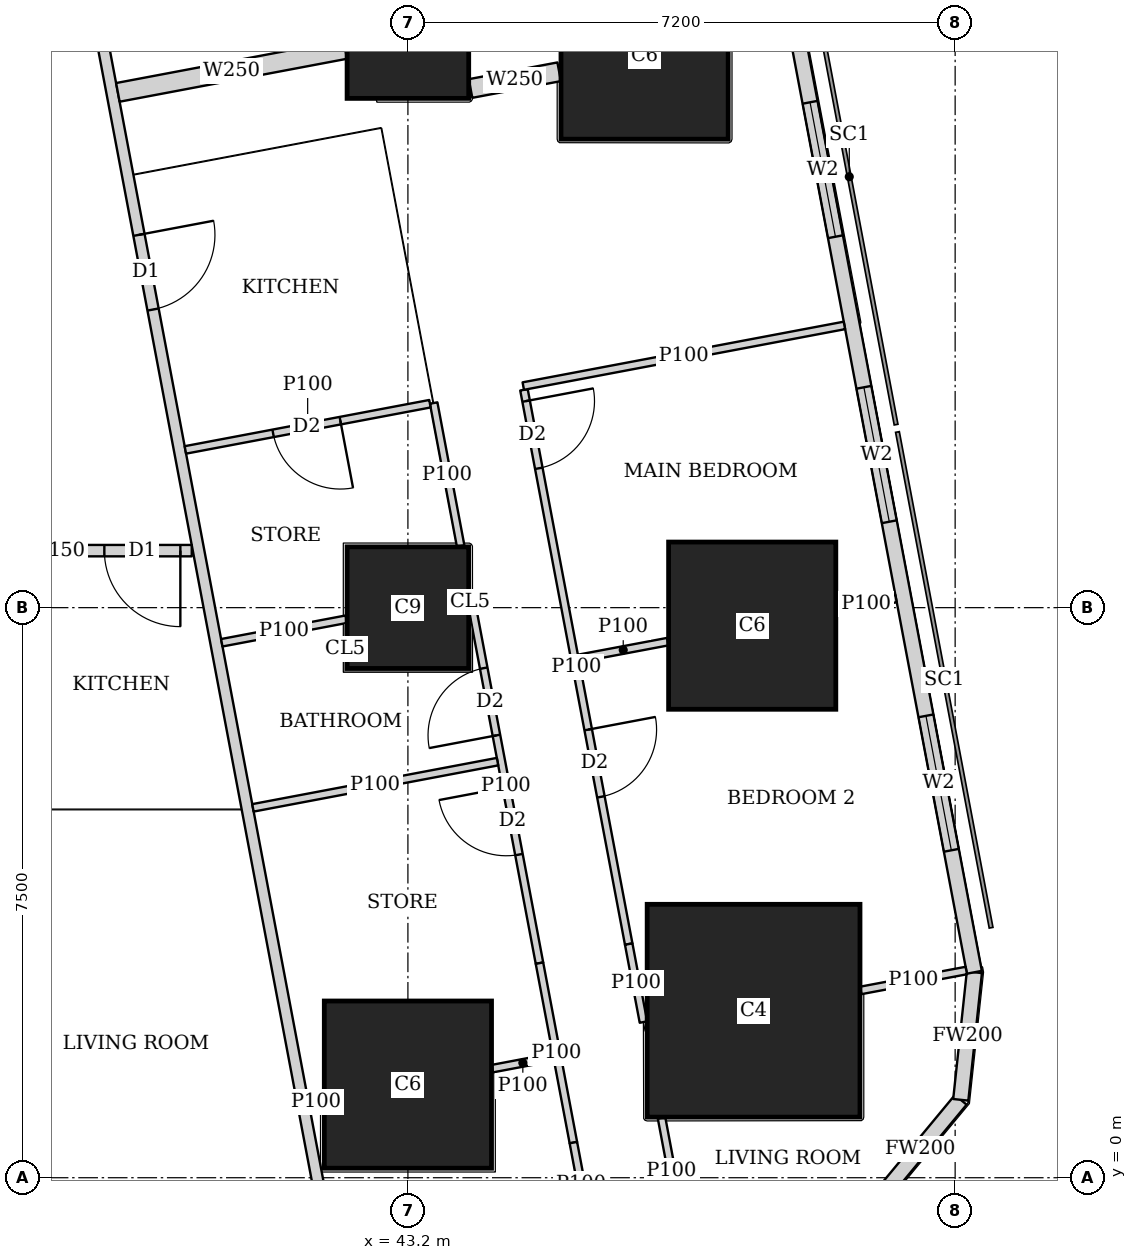
"""IFC4 building model, lengths in metres.
Left out: names, types, materials, properties, quantities, classifications, styles, units other than length and angle.
Written with IfcOpenShell. Run it as: python <this file> out.ifc"""

import sys

from ifc_helpers import new_model, si_unit, direction, frame, frame_2d, origin, origin_2d, place, context, subcontext, project, spatial, rectangle, extrude, element, fill, save


model = new_model("IFC4")
c1 = context("Model", 3, precision=1e-05, world=origin(), true_north=direction((0.0, 1.0)))
c2 = subcontext(c1, "Body", "Model", "MODEL_VIEW")
j1 = project(units=[si_unit("LENGTHUNIT", "METRE"), si_unit("PLANEANGLEUNIT", "RADIAN")], contexts=[c1])
p1 = place(None, origin())
s1 = spatial("IfcSite", under=j1, at=p1, CompositionType="ELEMENT")
p2 = place(p1, origin())
s2 = spatial("IfcBuilding", under=s1, at=p2, CompositionType="ELEMENT")
p3 = place(p2, frame((0.0, 0.0, 122.9)))
s3 = spatial("IfcBuildingStorey", under=s2, at=p3, CompositionType="ELEMENT", Elevation=122.9)
p4 = place(p3, frame((43.2, 1.225, 0.0), z_axis=(0.0, 0.0, 1.0), x_axis=(1.0, 0.0, 0.0)))
e1 = element("IfcColumn", 1, at=p4, inside=s3, PredefinedType="COLUMN", context=c2, shape_type="SweptSolid", body=[
    extrude(rectangle(XDim=2.2, YDim=2.2, at=origin_2d()), origin(), (0.0, 0.0, 1.0), 3.75),
])
p5 = place(p3, frame((47.748, 2.197, 0.0), z_axis=(0.0, 0.0, 1.0), x_axis=(1.0, 0.0, 0.0)))
e2 = element("IfcColumn", 2, at=p5, inside=s3, PredefinedType="COLUMN", context=c2, shape_type="SweptSolid", body=[
    extrude(rectangle(XDim=2.8, YDim=2.8, at=origin_2d()), origin(), (0.0, 0.0, 1.0), 3.75),
])
p6 = place(p3, frame((43.2, 7.5, 0.0), z_axis=(0.0, 0.0, 1.0), x_axis=(1.0, 0.0, 0.0)))
e3 = element("IfcColumn", 3, at=p6, inside=s3, PredefinedType="COLUMN", context=c2, shape_type="SweptSolid", body=[
    extrude(rectangle(XDim=1.6, YDim=1.6, at=origin_2d()), origin(), (0.0, 0.0, 1.0), 3.75),
])
p7 = place(p3, frame((47.73, 7.263, 0.0), z_axis=(0.0, 0.0, 1.0), x_axis=(1.0, 0.0, 0.0)))
e4 = element("IfcColumn", 4, at=p7, inside=s3, PredefinedType="COLUMN", context=c2, shape_type="SweptSolid", body=[
    extrude(rectangle(XDim=2.2, YDim=2.2, at=origin_2d()), origin(), (0.0, 0.0, 1.0), 3.75),
])
p8 = place(p3, frame((43.2, 15.0, 0.0), z_axis=(0.0, 0.0, 1.0), x_axis=(1.0, 0.0, 0.0)))
e5 = element("IfcColumn", 5, at=p8, inside=s3, PredefinedType="COLUMN", context=c2, shape_type="SweptSolid", body=[
    extrude(rectangle(XDim=1.6, YDim=1.6, at=origin_2d()), origin(), (0.0, 0.0, 1.0), 3.75),
])
p9 = place(p3, frame((46.314, 14.763, 0.0), z_axis=(0.0, 0.0, 1.0), x_axis=(1.0, 0.0, 0.0)))
e6 = element("IfcColumn", 6, at=p9, inside=s3, PredefinedType="COLUMN", context=c2, shape_type="SweptSolid", body=[
    extrude(rectangle(XDim=2.2, YDim=2.2, at=origin_2d()), origin(), (0.0, 0.0, 1.0), 3.75),
])
p10 = place(p3, frame((49.407, -0.263, 0.0), z_axis=(0.0, 0.0, 1.0), x_axis=(0.638042593423, 0.770001070764, 0.0)))
e7 = element("IfcWall", 7, at=p10, inside=s3, PredefinedType="SOLIDWALL", context=c2, shape_type="SweptSolid", body=[
    extrude(rectangle(XDim=1.673, YDim=0.2, at=frame_2d((0.836, 0.0))), origin(), (0.0, 0.0, 1.0), 3.5),
])
p11 = place(p3, frame((50.474, 1.025, 0.0), z_axis=(0.0, 0.0, 1.0), x_axis=(0.106047815515, 0.994361031429, 0.0)))
e8 = element("IfcWall", 8, at=p11, inside=s3, PredefinedType="SOLIDWALL", context=c2, shape_type="SweptSolid", body=[
    extrude(rectangle(XDim=1.688, YDim=0.2, at=frame_2d((0.844, 0.0))), origin(), (0.0, 0.0, 1.0), 3.5),
])
p12 = place(p3, frame((50.653, 2.703, 0.0), z_axis=(0.0, 0.0, 1.0), x_axis=(-0.185612026696, 0.982623109613, 0.0)))
e9 = element("IfcWall", 9, at=p12, inside=s3, PredefinedType="SOLIDWALL", context=c2, shape_type="SweptSolid", body=[
    extrude(rectangle(XDim=41.393, YDim=0.2, at=frame_2d((20.697, 0.0))), origin(), (0.0, 0.0, 1.0), 3.5),
])
p13 = place(p12, frame((1.633, 0.0, 0.9)))
e10 = element("IfcOpeningElement", 10, at=p13, cuts=e9, PredefinedType="OPENING", context=c2, shape_type="SweptSolid", body=[
    extrude(rectangle(XDim=1.8, YDim=1.5, at=frame_2d((0.9, 0.75))), frame((0.0, 0.11, 0.0), z_axis=(0.0, -1.0, 0.0), x_axis=(1.0, 0.0, 0.0)), (0.0, 0.0, 1.0), 0.22),
])
p14 = place(p12, frame((6.032, 0.0, 0.9)))
e11 = element("IfcOpeningElement", 11, at=p14, cuts=e9, PredefinedType="OPENING", context=c2, shape_type="SweptSolid", body=[
    extrude(rectangle(XDim=1.8, YDim=1.5, at=frame_2d((0.9, 0.75))), frame((0.0, 0.11, 0.0), z_axis=(0.0, -1.0, 0.0), x_axis=(1.0, 0.0, 0.0)), (0.0, 0.0, 1.0), 0.22),
])
p15 = place(p12, frame((9.848, 0.0, 0.9)))
e12 = element("IfcOpeningElement", 12, at=p15, cuts=e9, PredefinedType="OPENING", context=c2, shape_type="SweptSolid", body=[
    extrude(rectangle(XDim=1.8, YDim=1.5, at=frame_2d((0.9, 0.75))), frame((0.0, 0.11, 0.0), z_axis=(0.0, -1.0, 0.0), x_axis=(1.0, 0.0, 0.0)), (0.0, 0.0, 1.0), 0.22),
])
p16 = place(p12, frame((13.664, 0.0, 0.9)))
e13 = element("IfcOpeningElement", 13, at=p16, cuts=e9, PredefinedType="OPENING", context=c2, shape_type="SweptSolid", body=[
    extrude(rectangle(XDim=1.8, YDim=1.5, at=frame_2d((0.9, 0.75))), frame((0.0, 0.11, 0.0), z_axis=(0.0, -1.0, 0.0), x_axis=(1.0, 0.0, 0.0)), (0.0, 0.0, 1.0), 0.22),
])
p17 = place(p12, frame((17.481, 0.0, 0.9)))
e14 = element("IfcOpeningElement", 14, at=p17, cuts=e9, PredefinedType="OPENING", context=c2, shape_type="SweptSolid", body=[
    extrude(rectangle(XDim=1.8, YDim=1.5, at=frame_2d((0.9, 0.75))), frame((0.0, 0.11, 0.0), z_axis=(0.0, -1.0, 0.0), x_axis=(1.0, 0.0, 0.0)), (0.0, 0.0, 1.0), 0.22),
])
p18 = place(p12, frame((21.297, 0.0, 0.9)))
e15 = element("IfcOpeningElement", 15, at=p18, cuts=e9, PredefinedType="OPENING", context=c2, shape_type="SweptSolid", body=[
    extrude(rectangle(XDim=1.8, YDim=1.5, at=frame_2d((0.9, 0.75))), frame((0.0, 0.11, 0.0), z_axis=(0.0, -1.0, 0.0), x_axis=(1.0, 0.0, 0.0)), (0.0, 0.0, 1.0), 0.22),
])
p19 = place(p12, frame((25.113, 0.0, 0.9)))
e16 = element("IfcOpeningElement", 16, at=p19, cuts=e9, PredefinedType="OPENING", context=c2, shape_type="SweptSolid", body=[
    extrude(rectangle(XDim=1.8, YDim=1.5, at=frame_2d((0.9, 0.75))), frame((0.0, 0.11, 0.0), z_axis=(0.0, -1.0, 0.0), x_axis=(1.0, 0.0, 0.0)), (0.0, 0.0, 1.0), 0.22),
])
p20 = place(p12, frame((28.93, 0.0, 0.9)))
e17 = element("IfcOpeningElement", 17, at=p20, cuts=e9, PredefinedType="OPENING", context=c2, shape_type="SweptSolid", body=[
    extrude(rectangle(XDim=1.8, YDim=1.5, at=frame_2d((0.9, 0.75))), frame((0.0, 0.11, 0.0), z_axis=(0.0, -1.0, 0.0), x_axis=(1.0, 0.0, 0.0)), (0.0, 0.0, 1.0), 0.22),
])
p21 = place(p12, frame((32.746, 0.0, 0.9)))
e18 = element("IfcOpeningElement", 18, at=p21, cuts=e9, PredefinedType="OPENING", context=c2, shape_type="SweptSolid", body=[
    extrude(rectangle(XDim=1.8, YDim=1.5, at=frame_2d((0.9, 0.75))), frame((0.0, 0.11, 0.0), z_axis=(0.0, -1.0, 0.0), x_axis=(1.0, 0.0, 0.0)), (0.0, 0.0, 1.0), 0.22),
])
p22 = place(p12, frame((36.481, 0.0, 0.9)))
e19 = element("IfcOpeningElement", 19, at=p22, cuts=e9, PredefinedType="OPENING", context=c2, shape_type="SweptSolid", body=[
    extrude(rectangle(XDim=1.8, YDim=1.5, at=frame_2d((0.9, 0.75))), frame((0.0, 0.11, 0.0), z_axis=(0.0, -1.0, 0.0), x_axis=(1.0, 0.0, 0.0)), (0.0, 0.0, 1.0), 0.22),
])
p23 = place(p3, frame((40.356, 8.25, 0.0), z_axis=(0.0, 0.0, 1.0), x_axis=(-1.0, 0.0, 0.0)))
e20 = element("IfcWall", 20, at=p23, inside=s3, PredefinedType="SOLIDWALL", context=c2, shape_type="SweptSolid", body=[
    extrude(rectangle(XDim=3.555, YDim=0.15, at=frame_2d((1.777, 0.0))), origin(), (0.0, 0.0, 1.0), 3.5),
])
p24 = place(p23, frame((0.15, 0.0, 0.0)))
e21 = element("IfcOpeningElement", 21, at=p24, cuts=e20, PredefinedType="OPENING", context=c2, shape_type="SweptSolid", body=[
    extrude(rectangle(XDim=1.0, YDim=2.1, at=frame_2d((0.5, 1.05))), frame((0.0, 0.085, 0.0), z_axis=(0.0, -1.0, 0.0), x_axis=(1.0, 0.0, 0.0)), (0.0, 0.0, 1.0), 0.17),
])
p25 = place(p3, frame((33.382, 45.65, 0.0), z_axis=(0.0, 0.0, 1.0), x_axis=(0.185593544777, -0.982626600565, 0.0)))
e22 = element("IfcWall", 22, at=p25, inside=s3, PredefinedType="SOLIDWALL", context=c2, shape_type="SweptSolid", body=[
    extrude(rectangle(XDim=47.118, YDim=0.15, at=frame_2d((23.559, 0.0))), origin(), (0.0, 0.0, 1.0), 2.2),
])
p26 = place(p25, frame((10.662, 0.0, 0.0)))
e23 = element("IfcOpeningElement", 23, at=p26, cuts=e22, PredefinedType="OPENING", context=c2, shape_type="SweptSolid", body=[
    extrude(rectangle(XDim=1.0, YDim=2.1, at=frame_2d((0.5, 1.05))), frame((0.0, 0.085, 0.0), z_axis=(0.0, -1.0, 0.0), x_axis=(1.0, 0.0, 0.0)), (0.0, 0.0, 1.0), 0.17),
])
p27 = place(p25, frame((15.237, 0.0, 0.0)))
e24 = element("IfcOpeningElement", 24, at=p27, cuts=e22, PredefinedType="OPENING", context=c2, shape_type="SweptSolid", body=[
    extrude(rectangle(XDim=1.0, YDim=2.1, at=frame_2d((0.5, 1.05))), frame((0.0, 0.085, 0.0), z_axis=(0.0, -1.0, 0.0), x_axis=(1.0, 0.0, 0.0)), (0.0, 0.0, 1.0), 0.17),
])
p28 = place(p25, frame((22.87, 0.0, 0.0)))
e25 = element("IfcOpeningElement", 25, at=p28, cuts=e22, PredefinedType="OPENING", context=c2, shape_type="SweptSolid", body=[
    extrude(rectangle(XDim=1.0, YDim=2.1, at=frame_2d((0.5, 1.05))), frame((0.0, 0.085, 0.0), z_axis=(0.0, -1.0, 0.0), x_axis=(1.0, 0.0, 0.0)), (0.0, 0.0, 1.0), 0.17),
])
p29 = place(p25, frame((33.833, 0.0, 0.0)))
e26 = element("IfcOpeningElement", 26, at=p29, cuts=e22, PredefinedType="OPENING", context=c2, shape_type="SweptSolid", body=[
    extrude(rectangle(XDim=1.0, YDim=2.1, at=frame_2d((0.5, 1.05))), frame((0.0, 0.085, 0.0), z_axis=(0.0, -1.0, 0.0), x_axis=(1.0, 0.0, 0.0)), (0.0, 0.0, 1.0), 0.17),
])
p30 = place(p3, frame((44.727, 10.366, 0.0), z_axis=(0.0, 0.0, 1.0), x_axis=(0.185678775129, -0.982610498858, 0.0)))
e27 = element("IfcWall", 27, at=p30, inside=s3, PredefinedType="PARTITIONING", context=c2, shape_type="SweptSolid", body=[
    extrude(rectangle(XDim=7.421, YDim=0.1, at=frame_2d((3.71, 0.0))), origin(), (0.0, 0.0, 1.0), 3.5),
])
p31 = place(p30, frame((0.151, 0.0, 0.0)))
e28 = element("IfcOpeningElement", 28, at=p31, cuts=e27, PredefinedType="OPENING", context=c2, shape_type="SweptSolid", body=[
    extrude(rectangle(XDim=0.9, YDim=2.1, at=frame_2d((0.45, 1.05))), frame((0.0, 0.06, 0.0), z_axis=(0.0, -1.0, 0.0), x_axis=(1.0, 0.0, 0.0)), (0.0, 0.0, 1.0), 0.12),
])
p32 = place(p30, frame((4.55, 0.0, 0.0)))
e29 = element("IfcOpeningElement", 29, at=p32, cuts=e27, PredefinedType="OPENING", context=c2, shape_type="SweptSolid", body=[
    extrude(rectangle(XDim=0.9, YDim=2.1, at=frame_2d((0.45, 1.05))), frame((0.0, 0.06, 0.0), z_axis=(0.0, -1.0, 0.0), x_axis=(1.0, 0.0, 0.0)), (0.0, 0.0, 1.0), 0.12),
])
p33 = place(p3, frame((46.105, 3.074, 0.0), z_axis=(0.0, 0.0, 1.0), x_axis=(0.185897769544, -0.982569091351, 0.0)))
e30 = element("IfcWall", 30, at=p33, inside=s3, PredefinedType="PARTITIONING", context=c2, shape_type="SweptSolid", body=[
    extrude(rectangle(XDim=1.044, YDim=0.1, at=frame_2d((0.522, 0.0))), origin(), (0.0, 0.0, 1.0), 2.05),
])
p34 = place(p3, frame((46.537, 0.787, 0.0), z_axis=(0.0, 0.0, 1.0), x_axis=(0.185348284603, -0.982672892368, 0.0)))
e31 = element("IfcWall", 31, at=p34, inside=s3, PredefinedType="PARTITIONING", context=c2, shape_type="SweptSolid", body=[
    extrude(rectangle(XDim=1.419, YDim=0.1, at=frame_2d((0.709, 0.0))), origin(), (0.0, 0.0, 1.0), 2.05),
])
p35 = place(p3, frame((43.539, 10.192, 0.0), z_axis=(0.0, 0.0, 1.0), x_axis=(0.185366049966, -0.982669541362, 0.0)))
e32 = element("IfcWall", 32, at=p35, inside=s3, PredefinedType="PARTITIONING", context=c2, shape_type="SweptSolid", body=[
    extrude(rectangle(XDim=1.915, YDim=0.1, at=frame_2d((0.958, 0.0))), origin(), (0.0, 0.0, 1.0), 3.5),
])
p36 = place(p3, frame((44.049, 7.49, 0.0), z_axis=(0.0, 0.0, 1.0), x_axis=(0.185666332607, -0.982612849975, 0.0)))
e33 = element("IfcWall", 33, at=p36, inside=s3, PredefinedType="PARTITIONING", context=c2, shape_type="SweptSolid", body=[
    extrude(rectangle(XDim=4.75, YDim=0.1, at=frame_2d((2.375, 0.0))), origin(), (0.0, 0.0, 1.0), 3.5),
])
p37 = place(p36, frame((0.8, 0.0, 0.0)))
e34 = element("IfcOpeningElement", 34, at=p37, cuts=e33, PredefinedType="OPENING", context=c2, shape_type="SweptSolid", body=[
    extrude(rectangle(XDim=0.9, YDim=2.1, at=frame_2d((0.45, 1.05))), frame((0.0, 0.06, 0.0), z_axis=(0.0, -1.0, 0.0), x_axis=(1.0, 0.0, 0.0)), (0.0, 0.0, 1.0), 0.12),
])
p38 = place(p36, frame((2.396, 0.0, 0.0)))
e35 = element("IfcOpeningElement", 35, at=p38, cuts=e33, PredefinedType="OPENING", context=c2, shape_type="SweptSolid", body=[
    extrude(rectangle(XDim=0.9, YDim=2.1, at=frame_2d((0.45, 1.05))), frame((0.0, 0.06, 0.0), z_axis=(0.0, -1.0, 0.0), x_axis=(1.0, 0.0, 0.0)), (0.0, 0.0, 1.0), 0.12),
])
p39 = place(p3, frame((44.931, 2.823, 0.0), z_axis=(0.0, 0.0, 1.0), x_axis=(0.185631845838, -0.982619365681, 0.0)))
e36 = element("IfcWall", 36, at=p39, inside=s3, PredefinedType="PARTITIONING", context=c2, shape_type="SweptSolid", body=[
    extrude(rectangle(XDim=2.403, YDim=0.1, at=frame_2d((1.201, 0.0))), origin(), (0.0, 0.0, 1.0), 2.05),
])
p40 = place(p3, frame((45.377, 0.462, 0.0), z_axis=(0.0, 0.0, 1.0), x_axis=(0.185513480919, -0.982641719243, 0.0)))
e37 = element("IfcWall", 37, at=p40, inside=s3, PredefinedType="PARTITIONING", context=c2, shape_type="SweptSolid", body=[
    extrude(rectangle(XDim=1.095, YDim=0.1, at=frame_2d((0.547, 0.0))), origin(), (0.0, 0.0, 1.0), 3.5),
])
p41 = place(p3, frame((48.943, 11.213, 0.0), z_axis=(0.0, 0.0, 1.0), x_axis=(-0.982633535512, -0.185556823879, 0.0)))
e38 = element("IfcWall", 38, at=p41, inside=s3, PredefinedType="PARTITIONING", context=c2, shape_type="SweptSolid", body=[
    extrude(rectangle(XDim=4.3, YDim=0.1, at=frame_2d((2.15, 0.0))), origin(), (0.0, 0.0, 1.0), 2.2),
])
p42 = place(p3, frame((49.622, 7.62, 0.0), z_axis=(0.0, 0.0, 1.0), x_axis=(-0.982512656401, -0.186195810938, 0.0)))
e39 = element("IfcWall", 39, at=p42, inside=s3, PredefinedType="PARTITIONING", context=c2, shape_type="SweptSolid", body=[
    extrude(rectangle(XDim=0.796, YDim=0.1, at=frame_2d((0.398, 0.0))), origin(), (0.0, 0.0, 1.0), 2.05),
])
p43 = place(p3, frame((46.62, 7.053, 0.0), z_axis=(0.0, 0.0, 1.0), x_axis=(-0.982749355621, -0.18494243436, 0.0)))
e40 = element("IfcWall", 40, at=p43, inside=s3, PredefinedType="PARTITIONING", context=c2, shape_type="SweptSolid", body=[
    extrude(rectangle(XDim=1.195, YDim=0.1, at=frame_2d((0.597, 0.0))), origin(), (0.0, 0.0, 1.0), 2.05),
])
p44 = place(p3, frame((50.547, 2.726, 0.0), z_axis=(0.0, 0.0, 1.0), x_axis=(-0.982680053146, -0.185310315822, 0.0)))
e41 = element("IfcWall", 41, at=p44, inside=s3, PredefinedType="PARTITIONING", context=c2, shape_type="SweptSolid", body=[
    extrude(rectangle(XDim=1.414, YDim=0.1, at=frame_2d((0.707, 0.0))), origin(), (0.0, 0.0, 1.0), 3.5),
])
p45 = place(p3, frame((43.49, 10.183, 0.0), z_axis=(0.0, 0.0, 1.0), x_axis=(-0.982607026909, -0.185697147715, 0.0)))
e42 = element("IfcWall", 42, at=p45, inside=s3, PredefinedType="PARTITIONING", context=c2, shape_type="SweptSolid", body=[
    extrude(rectangle(XDim=3.275, YDim=0.1, at=frame_2d((1.637, 0.0))), origin(), (0.0, 0.0, 1.0), 3.5),
])
p46 = place(p45, frame((1.2, 0.0, 0.0)))
e43 = element("IfcOpeningElement", 43, at=p46, cuts=e42, PredefinedType="OPENING", context=c2, shape_type="SweptSolid", body=[
    extrude(rectangle(XDim=0.9, YDim=2.1, at=frame_2d((0.45, 1.05))), frame((0.0, 0.06, 0.0), z_axis=(0.0, -1.0, 0.0), x_axis=(1.0, 0.0, 0.0)), (0.0, 0.0, 1.0), 0.12),
])
p47 = place(p3, frame((42.39, 7.348, 0.0), z_axis=(0.0, 0.0, 1.0), x_axis=(-0.9825976927, -0.185746532405, 0.0)))
e44 = element("IfcWall", 44, at=p47, inside=s3, PredefinedType="PARTITIONING", context=c2, shape_type="SweptSolid", body=[
    extrude(rectangle(XDim=1.668, YDim=0.1, at=frame_2d((0.834, 0.0))), origin(), (0.0, 0.0, 1.0), 3.5),
])
p48 = place(p3, frame((45.114, 1.587, 0.0), z_axis=(0.0, 0.0, 1.0), x_axis=(-0.982624706348, -0.185603573443, 0.0)))
e45 = element("IfcWall", 45, at=p48, inside=s3, PredefinedType="PARTITIONING", context=c2, shape_type="SweptSolid", body=[
    extrude(rectangle(XDim=0.818, YDim=0.1, at=frame_2d((0.409, 0.0))), origin(), (0.0, 0.0, 1.0), 2.05),
])
p49 = place(p3, frame((42.09, 1.016, 0.0), z_axis=(0.0, 0.0, 1.0), x_axis=(-0.982208563973, -0.187793335502, 0.0)))
e46 = element("IfcWall", 46, at=p49, inside=s3, PredefinedType="PARTITIONING", context=c2, shape_type="SweptSolid", body=[
    extrude(rectangle(XDim=0.198, YDim=0.1, at=frame_2d((0.099, 0.0))), origin(), (0.0, 0.0, 1.0), 2.05),
])
p50 = place(p3, frame((44.379, 5.474, 0.0), z_axis=(0.0, 0.0, 1.0), x_axis=(-0.982607026909, -0.185697147715, 0.0)))
e47 = element("IfcWall", 47, at=p50, inside=s3, PredefinedType="PARTITIONING", context=c2, shape_type="SweptSolid", body=[
    extrude(rectangle(XDim=3.275, YDim=0.1, at=frame_2d((1.637, 0.0))), origin(), (0.0, 0.0, 1.0), 3.5),
])
p51 = place(p3, frame((45.19, 14.55, 0.0), z_axis=(0.0, 0.0, 1.0), x_axis=(-0.982666604435, -0.185381618634, 0.0)))
e48 = element("IfcWall", 48, at=p51, inside=s3, PredefinedType="SOLIDWALL", context=c2, shape_type="SweptSolid", body=[
    extrude(rectangle(XDim=1.187, YDim=0.25, at=frame_2d((0.593, 0.0))), origin(), (0.0, 0.0, 1.0), 3.5),
])
p52 = place(p3, frame((42.376, 14.844, 0.0), z_axis=(0.0, 0.0, 1.0), x_axis=(-0.982636286056, -0.185542257522, 0.0)))
e49 = element("IfcWall", 49, at=p52, inside=s3, PredefinedType="SOLIDWALL", context=c2, shape_type="SweptSolid", body=[
    extrude(rectangle(XDim=3.045, YDim=0.25, at=frame_2d((1.522, 0.0))), origin(), (0.0, 0.0, 1.0), 3.5),
])
p53 = place(p13, origin())
e50 = element("IfcWindow", 50, at=p53, inside=s3, PartitioningType="SINGLE_PANEL", PredefinedType="WINDOW", context=c2, shape_type="SweptSolid", body=[
    extrude(rectangle(XDim=1.8, YDim=1.5, at=frame_2d((0.9, 0.75))), frame((0.0, 0.03, 0.0), z_axis=(0.0, -1.0, 0.0), x_axis=(1.0, 0.0, 0.0)), (0.0, 0.0, 1.0), 0.06),
])
fill(e10, e50)
p54 = place(p14, origin())
e51 = element("IfcWindow", 51, at=p54, inside=s3, PartitioningType="SINGLE_PANEL", PredefinedType="WINDOW", context=c2, shape_type="SweptSolid", body=[
    extrude(rectangle(XDim=1.8, YDim=1.5, at=frame_2d((0.9, 0.75))), frame((0.0, 0.03, 0.0), z_axis=(0.0, -1.0, 0.0), x_axis=(1.0, 0.0, 0.0)), (0.0, 0.0, 1.0), 0.06),
])
fill(e11, e51)
p55 = place(p15, origin())
e52 = element("IfcWindow", 52, at=p55, inside=s3, PartitioningType="SINGLE_PANEL", PredefinedType="WINDOW", context=c2, shape_type="SweptSolid", body=[
    extrude(rectangle(XDim=1.8, YDim=1.5, at=frame_2d((0.9, 0.75))), frame((0.0, 0.03, 0.0), z_axis=(0.0, -1.0, 0.0), x_axis=(1.0, 0.0, 0.0)), (0.0, 0.0, 1.0), 0.06),
])
fill(e12, e52)
p56 = place(p24, origin())
e53 = element("IfcDoor", 53, at=p56, inside=s3, OperationType="SINGLE_SWING_LEFT", PredefinedType="DOOR", context=c2, shape_type="SweptSolid", body=[
    extrude(rectangle(XDim=1.0, YDim=2.1, at=frame_2d((0.5, 1.05))), frame((0.0, 0.025, 0.0), z_axis=(0.0, -1.0, 0.0), x_axis=(1.0, 0.0, 0.0)), (0.0, 0.0, 1.0), 0.05),
])
fill(e21, e53)
p57 = place(p31, origin())
e54 = element("IfcDoor", 54, at=p57, inside=s3, OperationType="SINGLE_SWING_LEFT", PredefinedType="DOOR", context=c2, shape_type="SweptSolid", body=[
    extrude(rectangle(XDim=0.9, YDim=2.1, at=frame_2d((0.45, 1.05))), frame((0.0, 0.025, 0.0), z_axis=(0.0, -1.0, 0.0), x_axis=(1.0, 0.0, 0.0)), (0.0, 0.0, 1.0), 0.05),
])
fill(e28, e54)
p58 = place(p32, origin())
e55 = element("IfcDoor", 55, at=p58, inside=s3, OperationType="SINGLE_SWING_LEFT", PredefinedType="DOOR", context=c2, shape_type="SweptSolid", body=[
    extrude(rectangle(XDim=0.9, YDim=2.1, at=frame_2d((0.45, 1.05))), frame((0.0, 0.025, 0.0), z_axis=(0.0, -1.0, 0.0), x_axis=(1.0, 0.0, 0.0)), (0.0, 0.0, 1.0), 0.05),
])
fill(e29, e55)
p59 = place(p37, origin())
e56 = element("IfcDoor", 56, at=p59, inside=s3, OperationType="SINGLE_SWING_LEFT", PredefinedType="DOOR", context=c2, shape_type="SweptSolid", body=[
    extrude(rectangle(XDim=0.9, YDim=2.1, at=frame_2d((0.45, 1.05))), frame((0.0, 0.025, 0.0), z_axis=(0.0, -1.0, 0.0), x_axis=(1.0, 0.0, 0.0)), (0.0, 0.0, 1.0), 0.05),
])
fill(e34, e56)
p60 = place(p38, origin())
e57 = element("IfcDoor", 57, at=p60, inside=s3, OperationType="SINGLE_SWING_RIGHT", PredefinedType="DOOR", context=c2, shape_type="SweptSolid", body=[
    extrude(rectangle(XDim=0.9, YDim=2.1, at=frame_2d((0.45, 1.05))), frame((0.0, 0.025, 0.0), z_axis=(0.0, -1.0, 0.0), x_axis=(1.0, 0.0, 0.0)), (0.0, 0.0, 1.0), 0.05),
])
fill(e35, e57)
p61 = place(p29, origin())
e58 = element("IfcDoor", 58, at=p61, inside=s3, OperationType="SINGLE_SWING_LEFT", PredefinedType="DOOR", context=c2, shape_type="SweptSolid", body=[
    extrude(rectangle(XDim=1.0, YDim=2.1, at=frame_2d((0.5, 1.05))), frame((0.0, 0.025, 0.0), z_axis=(0.0, -1.0, 0.0), x_axis=(1.0, 0.0, 0.0)), (0.0, 0.0, 1.0), 0.05),
])
fill(e26, e58)
p62 = place(p46, origin())
e59 = element("IfcDoor", 59, at=p62, inside=s3, OperationType="SINGLE_SWING_LEFT", PredefinedType="DOOR", context=c2, shape_type="SweptSolid", body=[
    extrude(rectangle(XDim=0.9, YDim=2.1, at=frame_2d((0.45, 1.05))), frame((0.0, 0.025, 0.0), z_axis=(0.0, -1.0, 0.0), x_axis=(1.0, 0.0, 0.0)), (0.0, 0.0, 1.0), 0.05),
])
fill(e43, e59)
save(model, sys.argv[1])
